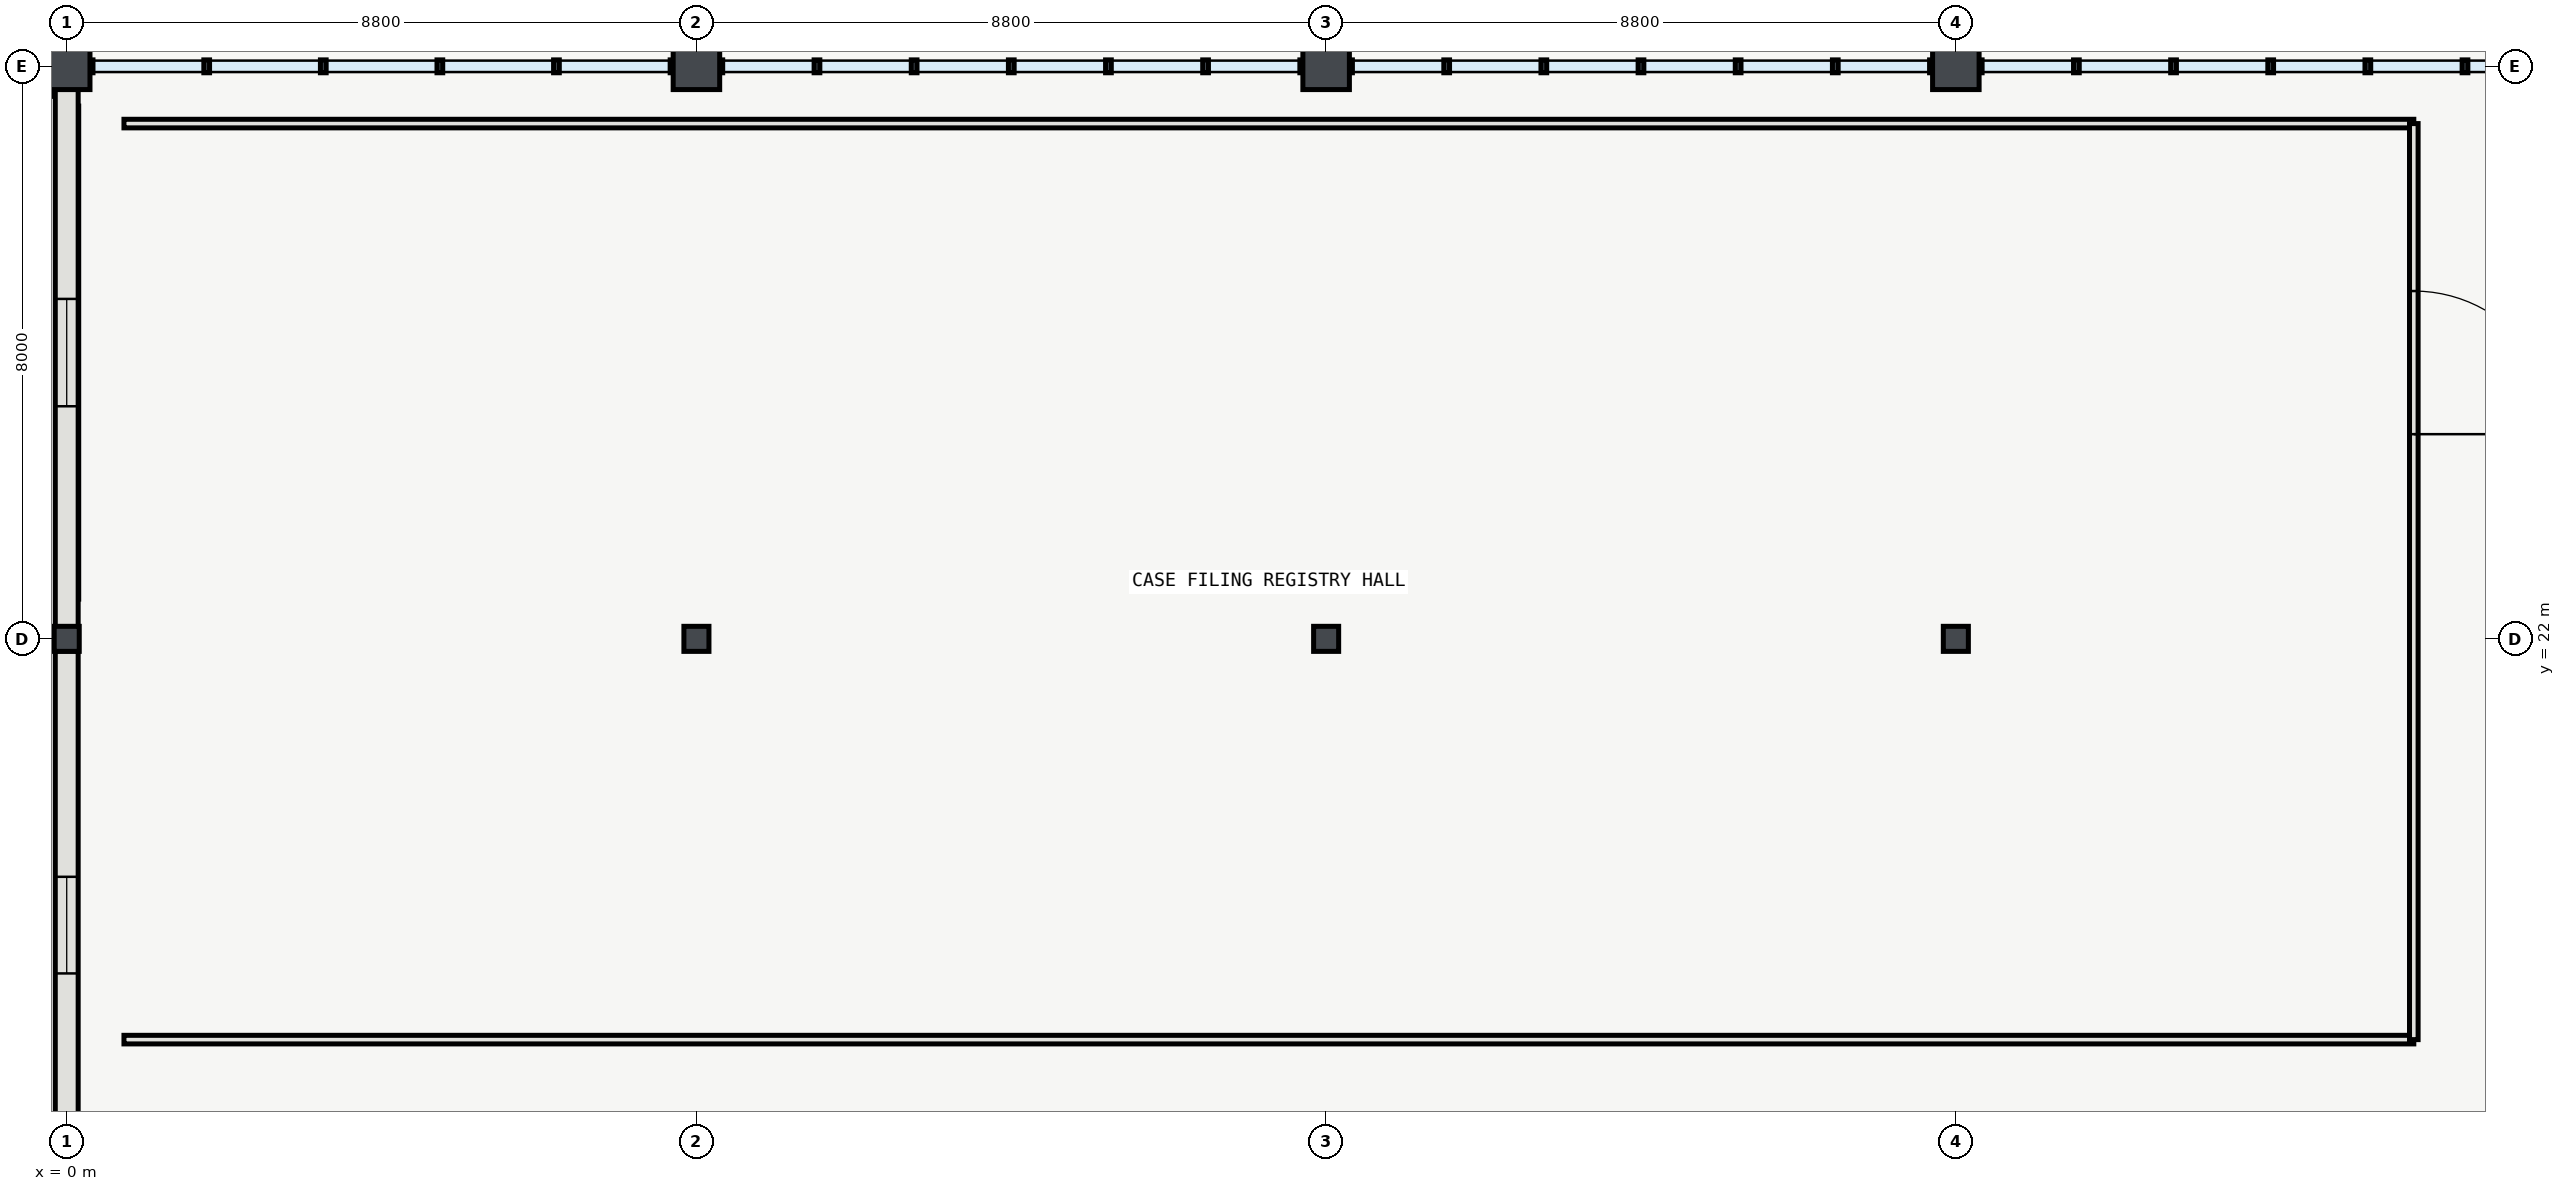
"""IFC4 building model, lengths in metres.
Left out: names, types, materials, properties, quantities, classifications, styles, units other than length and angle.
Written with IfcOpenShell. Run it as: python <this file> out.ifc"""

import sys

from ifc_helpers import new_model, si_unit, direction, frame, frame_2d, origin, origin_2d, place, context, subcontext, project, spatial, rectangle, hollow_rectangle, i_section, extrude, element, fill, save


model = new_model("IFC4")
c1 = context("Model", 3, precision=1e-05, world=origin(), true_north=direction((0.0, 1.0)))
c2 = subcontext(c1, "Body", "Model", "MODEL_VIEW")
j1 = project(units=[si_unit("LENGTHUNIT", "METRE"), si_unit("PLANEANGLEUNIT", "RADIAN")], contexts=[c1])
p1 = place(None, origin())
s1 = spatial("IfcSite", under=j1, at=p1, CompositionType="ELEMENT")
p2 = place(p1, origin())
s2 = spatial("IfcBuilding", under=s1, at=p2, CompositionType="ELEMENT")
p3 = place(p2, origin())
s3 = spatial("IfcBuildingStorey", under=s2, at=p3, CompositionType="ELEMENT", Elevation=0.0)
p4 = place(p3, frame((0.0, 22.0, 0.0), z_axis=(0.0, 0.0, 1.0), x_axis=(1.0, 0.0, 0.0)))
e1 = element("IfcColumn", 1, at=p4, inside=s3, PredefinedType="COLUMN", context=c2, shape_type="SweptSolid", body=[
    extrude(i_section(OverallWidth=0.35, OverallDepth=0.35, WebThickness=0.012, FlangeThickness=0.019, FilletRadius=0.02, at=origin_2d()), origin(), (0.0, 0.0, 1.0), 5.4),
])
p5 = place(p3, frame((0.0, 30.0, 0.0), z_axis=(0.0, 0.0, 1.0), x_axis=(1.0, 0.0, 0.0)))
e2 = element("IfcColumn", 2, at=p5, inside=s3, PredefinedType="COLUMN", context=c2, shape_type="SweptSolid", body=[
    extrude(hollow_rectangle(XDim=0.65, YDim=0.65, WallThickness=0.026, InnerFilletRadius=0.026, OuterFilletRadius=0.052, at=origin_2d()), origin(), (0.0, 0.0, 1.0), 5.4),
])
p6 = place(p3, frame((8.8, 22.0, 0.0), z_axis=(0.0, 0.0, 1.0), x_axis=(1.0, 0.0, 0.0)))
e3 = element("IfcColumn", 3, at=p6, inside=s3, PredefinedType="COLUMN", context=c2, shape_type="SweptSolid", body=[
    extrude(i_section(OverallWidth=0.35, OverallDepth=0.35, WebThickness=0.012, FlangeThickness=0.019, FilletRadius=0.02, at=origin_2d()), origin(), (0.0, 0.0, 1.0), 5.4),
])
p7 = place(p3, frame((8.8, 30.0, 0.0), z_axis=(0.0, 0.0, 1.0), x_axis=(1.0, 0.0, 0.0)))
e4 = element("IfcColumn", 4, at=p7, inside=s3, PredefinedType="COLUMN", context=c2, shape_type="SweptSolid", body=[
    extrude(hollow_rectangle(XDim=0.65, YDim=0.65, WallThickness=0.026, InnerFilletRadius=0.026, OuterFilletRadius=0.052, at=origin_2d()), origin(), (0.0, 0.0, 1.0), 5.4),
])
p8 = place(p3, frame((17.6, 22.0, 0.0), z_axis=(0.0, 0.0, 1.0), x_axis=(1.0, 0.0, 0.0)))
e5 = element("IfcColumn", 5, at=p8, inside=s3, PredefinedType="COLUMN", context=c2, shape_type="SweptSolid", body=[
    extrude(i_section(OverallWidth=0.35, OverallDepth=0.35, WebThickness=0.012, FlangeThickness=0.019, FilletRadius=0.02, at=origin_2d()), origin(), (0.0, 0.0, 1.0), 5.4),
])
p9 = place(p3, frame((17.6, 30.0, 0.0), z_axis=(0.0, 0.0, 1.0), x_axis=(1.0, 0.0, 0.0)))
e6 = element("IfcColumn", 6, at=p9, inside=s3, PredefinedType="COLUMN", context=c2, shape_type="SweptSolid", body=[
    extrude(hollow_rectangle(XDim=0.65, YDim=0.65, WallThickness=0.026, InnerFilletRadius=0.026, OuterFilletRadius=0.052, at=origin_2d()), origin(), (0.0, 0.0, 1.0), 5.4),
])
p10 = place(p3, frame((26.4, 22.0, 0.0), z_axis=(0.0, 0.0, 1.0), x_axis=(1.0, 0.0, 0.0)))
e7 = element("IfcColumn", 7, at=p10, inside=s3, PredefinedType="COLUMN", context=c2, shape_type="SweptSolid", body=[
    extrude(i_section(OverallWidth=0.35, OverallDepth=0.35, WebThickness=0.012, FlangeThickness=0.019, FilletRadius=0.02, at=origin_2d()), origin(), (0.0, 0.0, 1.0), 5.4),
])
p11 = place(p3, frame((26.4, 30.0, 0.0), z_axis=(0.0, 0.0, 1.0), x_axis=(1.0, 0.0, 0.0)))
e8 = element("IfcColumn", 8, at=p11, inside=s3, PredefinedType="COLUMN", context=c2, shape_type="SweptSolid", body=[
    extrude(hollow_rectangle(XDim=0.65, YDim=0.65, WallThickness=0.026, InnerFilletRadius=0.026, OuterFilletRadius=0.052, at=origin_2d()), origin(), (0.0, 0.0, 1.0), 5.4),
])
p12 = place(p3, frame((0.0, 21.829, 0.0), z_axis=(0.0, 0.0, 1.0), x_axis=(0.0, -1.0, 0.0)))
e9 = element("IfcWall", 9, at=p12, inside=s3, PredefinedType="SOLIDWALL", context=c2, shape_type="SweptSolid", body=[
    extrude(rectangle(XDim=7.658, YDim=0.32, at=frame_2d((3.829, 0.0))), origin(), (0.0, 0.0, 1.0), 4.523),
])
p13 = place(p12, frame((3.154, 0.0, 0.95)))
e10 = element("IfcOpeningElement", 10, at=p13, cuts=e9, PredefinedType="OPENING", context=c2, shape_type="SweptSolid", body=[
    extrude(rectangle(XDim=1.35, YDim=2.1, at=frame_2d((0.675, 1.05))), frame((0.0, 0.17, 0.0), z_axis=(0.0, -1.0, 0.0), x_axis=(1.0, 0.0, 0.0)), (0.0, 0.0, 1.0), 0.34),
])
p14 = place(p3, frame((0.0, 29.679, 0.0), z_axis=(0.0, 0.0, 1.0), x_axis=(0.0, -1.0, 0.0)))
e11 = element("IfcWall", 11, at=p14, inside=s3, PredefinedType="SOLIDWALL", context=c2, shape_type="SweptSolid", body=[
    extrude(rectangle(XDim=7.508, YDim=0.32, at=frame_2d((3.754, 0.0))), origin(), (0.0, 0.0, 1.0), 4.523),
])
p15 = place(p14, frame((2.929, 0.0, 0.95)))
e12 = element("IfcOpeningElement", 12, at=p15, cuts=e11, PredefinedType="OPENING", context=c2, shape_type="SweptSolid", body=[
    extrude(rectangle(XDim=1.5, YDim=2.1, at=frame_2d((0.75, 1.05))), frame((0.0, 0.17, 0.0), z_axis=(0.0, -1.0, 0.0), x_axis=(1.0, 0.0, 0.0)), (0.0, 0.0, 1.0), 0.34),
])
for number, where, z_axis, x_axis in (
    (13, (0.8, 16.4, 0.0), (0.0, 0.0, 1.0), (1.0, 0.0, 0.0)),
    (14, (32.8, 29.2, 0.0), (0.0, 0.0, 1.0), (-1.0, 0.0, 0.0)),
):
    element("IfcWall", number, at=place(p3, frame(where, z_axis=z_axis, x_axis=x_axis)), inside=s3, PredefinedType="PARTITIONING", context=c2, shape_type="SweptSolid", body=[
        extrude(rectangle(XDim=32.0, YDim=0.12, at=frame_2d((16.0, 0.0))), origin(), (0.0, 0.0, 1.0), 5.12),
    ])
p16 = place(p3, frame((32.8, 16.4, 0.0), z_axis=(0.0, 0.0, 1.0), x_axis=(0.0, 1.0, 0.0)))
e15 = element("IfcWall", 15, at=p16, inside=s3, PredefinedType="PARTITIONING", context=c2, shape_type="SweptSolid", body=[
    extrude(rectangle(XDim=12.8, YDim=0.12, at=frame_2d((6.4, 0.0))), origin(), (0.0, 0.0, 1.0), 5.12),
])
p17 = place(p16, frame((8.46, 0.0, 0.0)))
e16 = element("IfcOpeningElement", 16, at=p17, cuts=e15, PredefinedType="OPENING", context=c2, shape_type="SweptSolid", body=[
    extrude(rectangle(XDim=2.0, YDim=2.4, at=frame_2d((1.0, 1.2))), frame((0.0, 0.07, 0.0), z_axis=(0.0, -1.0, 0.0), x_axis=(1.0, 0.0, 0.0)), (0.0, 0.0, 1.0), 0.14),
])
p18 = place(p13, origin())
e17 = element("IfcWindow", 17, at=p18, inside=s3, PartitioningType="SINGLE_PANEL", PredefinedType="WINDOW", context=c2, shape_type="SweptSolid", body=[
    extrude(rectangle(XDim=1.35, YDim=2.1, at=frame_2d((0.675, 1.05))), frame((0.0, 0.03, 0.0), z_axis=(0.0, -1.0, 0.0), x_axis=(1.0, 0.0, 0.0)), (0.0, 0.0, 1.0), 0.06),
])
fill(e10, e17)
p19 = place(p15, origin())
e18 = element("IfcWindow", 18, at=p19, inside=s3, PartitioningType="SINGLE_PANEL", PredefinedType="WINDOW", context=c2, shape_type="SweptSolid", body=[
    extrude(rectangle(XDim=1.5, YDim=2.1, at=frame_2d((0.75, 1.05))), frame((0.0, 0.03, 0.0), z_axis=(0.0, -1.0, 0.0), x_axis=(1.0, 0.0, 0.0)), (0.0, 0.0, 1.0), 0.06),
])
fill(e12, e18)
p20 = place(p17, origin())
e19 = element("IfcDoor", 19, at=p20, inside=s3, OperationType="DOUBLE_DOOR_SINGLE_SWING", PredefinedType="DOOR", context=c2, shape_type="SweptSolid", body=[
    extrude(rectangle(XDim=2.0, YDim=2.4, at=frame_2d((1.0, 1.2))), frame((0.0, 0.025, 0.0), z_axis=(0.0, -1.0, 0.0), x_axis=(1.0, 0.0, 0.0)), (0.0, 0.0, 1.0), 0.05),
])
fill(e16, e19)
save(model, sys.argv[1])
